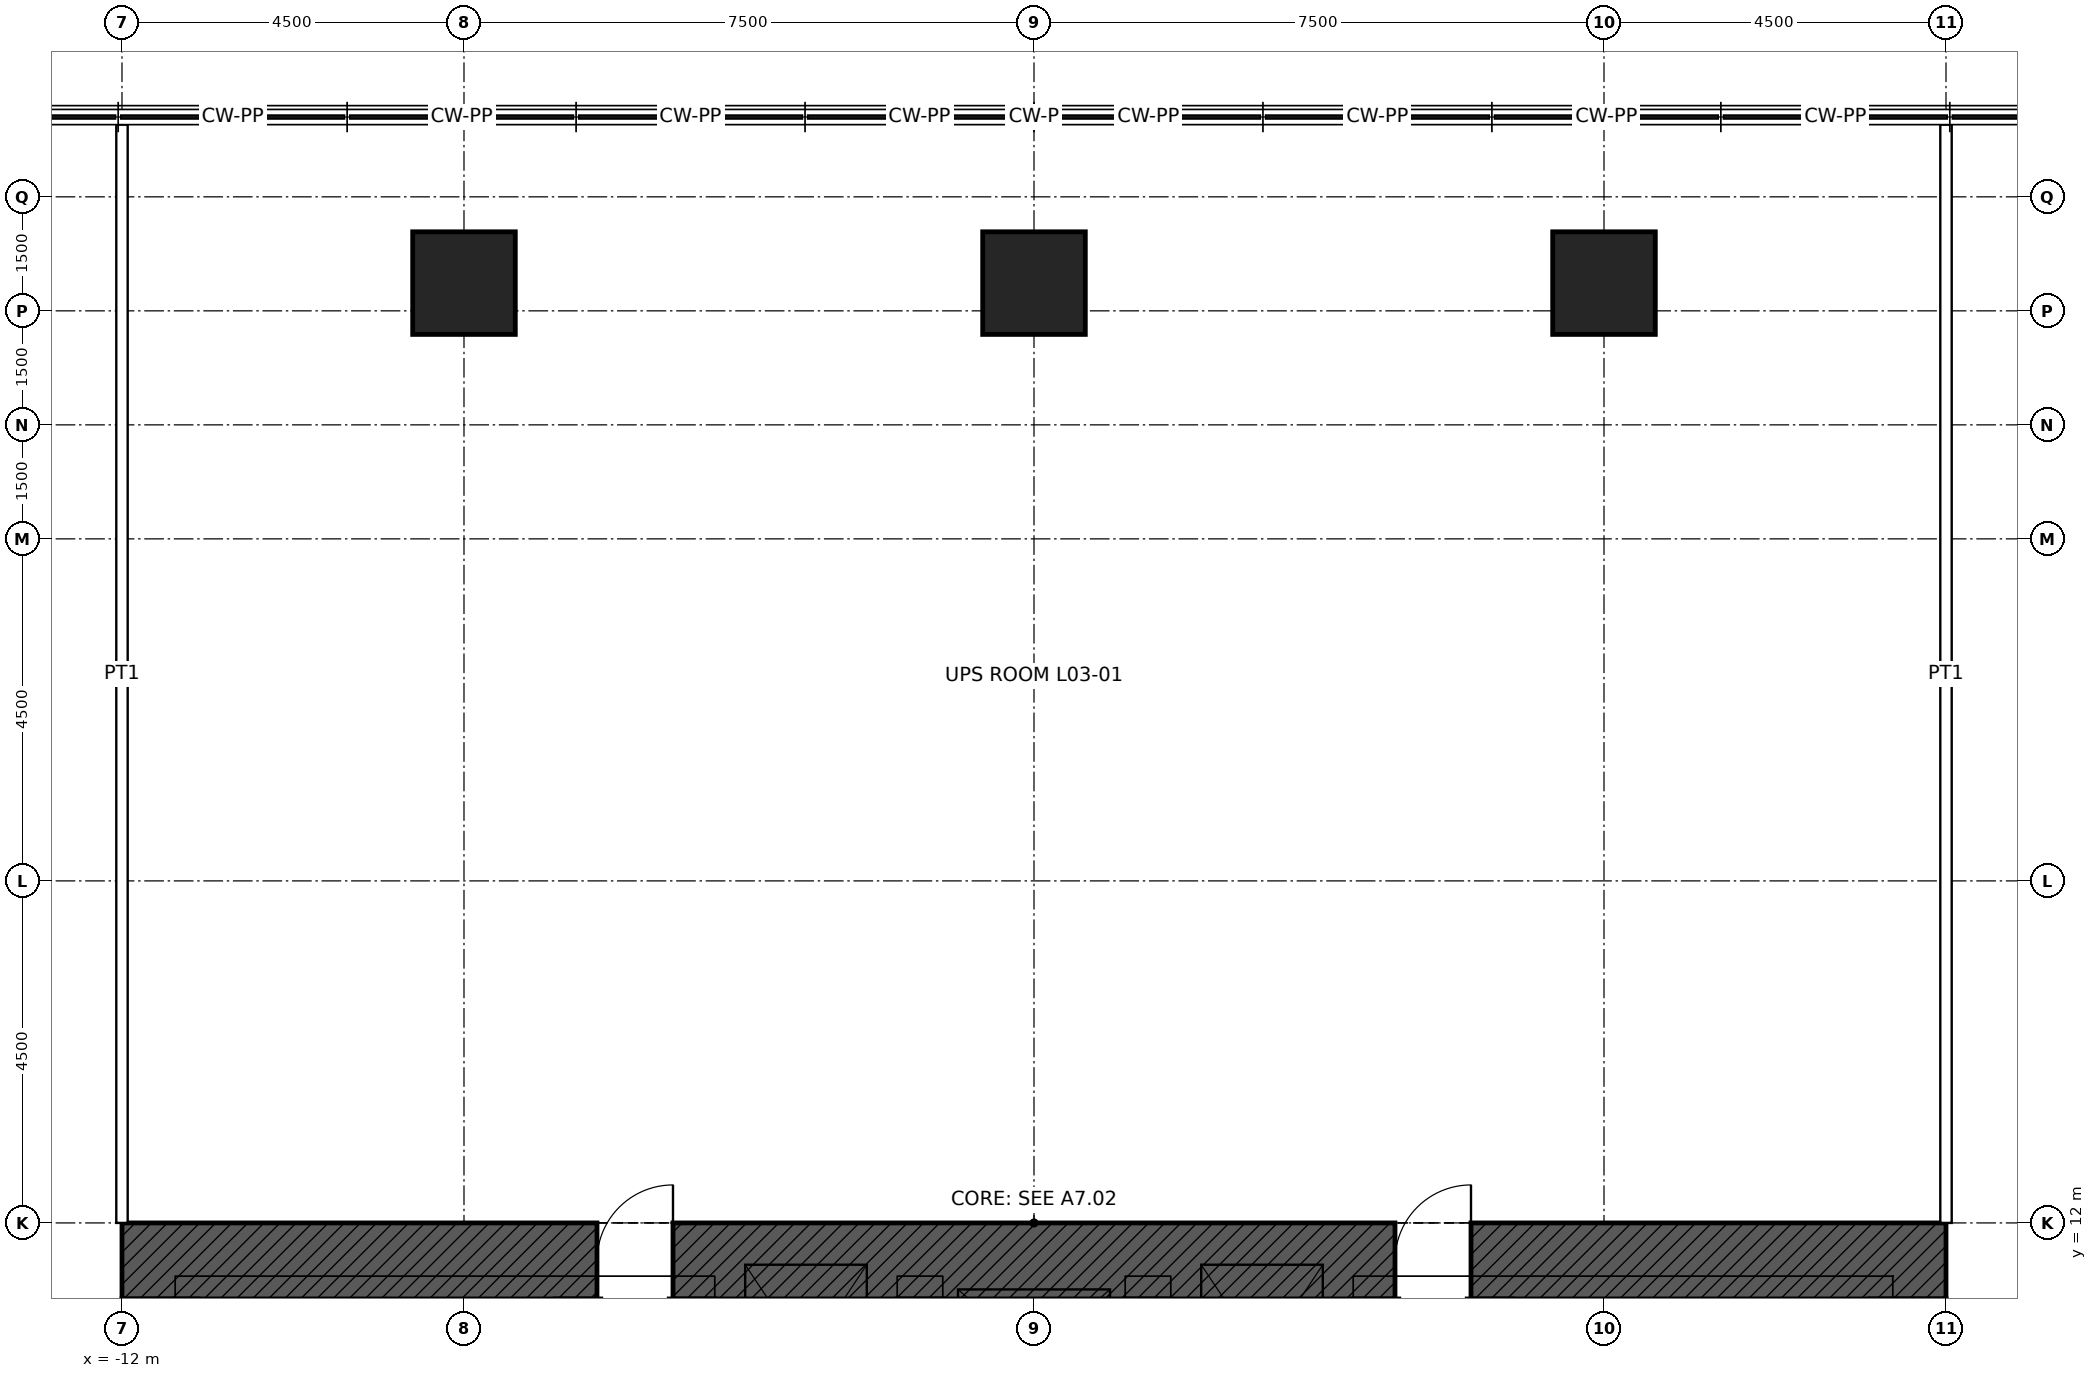
"""IFC4 building model, lengths in metres.
Left out: names, types, materials, properties, quantities, classifications, styles, units other than length and angle.
Written with IfcOpenShell. Run it as: python <this file> out.ifc"""

import sys

from ifc_helpers import new_model, si_unit, direction, frame, frame_2d, origin, origin_2d, place, context, subcontext, project, spatial, rectangle, hollow_rectangle, extrude, element, fill, save


model = new_model("IFC4")
c1 = context("Model", 3, precision=1e-05, world=origin(), true_north=direction((0.0, 1.0)))
c2 = subcontext(c1, "Body", "Model", "MODEL_VIEW")
j1 = project(units=[si_unit("LENGTHUNIT", "METRE"), si_unit("PLANEANGLEUNIT", "RADIAN")], contexts=[c1])
p1 = place(None, origin())
s1 = spatial("IfcSite", under=j1, at=p1, CompositionType="ELEMENT")
p2 = place(p1, origin())
s2 = spatial("IfcBuilding", under=s1, at=p2, CompositionType="ELEMENT")
p3 = place(p2, frame((0.0, 0.0, 18.0)))
s3 = spatial("IfcBuildingStorey", under=s2, at=p3, CompositionType="ELEMENT", Elevation=18.0)
for number, where, z_axis, x_axis in (
    (1, (-7.5, 24.365, 0.0), (0.0, 0.0, 1.0), (1.0, 0.0, 0.0)),
    (2, (0.0, 24.365, 0.0), (0.0, 0.0, 1.0), (1.0, 0.0, 0.0)),
    (3, (7.5, 24.365, 0.0), (0.0, 0.0, 1.0), (1.0, 0.0, 0.0)),
):
    element("IfcColumn", number, at=place(p3, frame(where, z_axis=z_axis, x_axis=x_axis)), inside=s3, PredefinedType="COLUMN", context=c2, shape_type="SweptSolid", body=[
        extrude(hollow_rectangle(XDim=1.35, YDim=1.35, WallThickness=0.1, at=origin_2d()), origin(), (0.0, 0.0, 1.0), 5.4),
    ])
p4 = place(p3, frame((-12.0, 11.5, 0.0), z_axis=(0.0, 0.0, 1.0), x_axis=(1.0, 0.0, 0.0)))
e4 = element("IfcWall", 4, at=p4, inside=s3, PredefinedType="SHEAR", context=c2, shape_type="SweptSolid", body=[
    extrude(rectangle(XDim=24.0, YDim=1.0, at=frame_2d((12.0, 0.0))), origin(), (0.0, 0.0, 1.0), 5.4),
])
p5 = place(p4, frame((6.25, 0.0, 0.0)))
e5 = element("IfcOpeningElement", 5, at=p5, cuts=e4, PredefinedType="OPENING", context=c2, shape_type="SweptSolid", body=[
    extrude(rectangle(XDim=1.0, YDim=2.4, at=frame_2d((0.5, 1.2))), frame((0.0, 0.51, 0.0), z_axis=(0.0, -1.0, 0.0), x_axis=(1.0, 0.0, 0.0)), (0.0, 0.0, 1.0), 1.02),
])
p6 = place(p4, frame((16.75, 0.0, 0.0)))
e6 = element("IfcOpeningElement", 6, at=p6, cuts=e4, PredefinedType="OPENING", context=c2, shape_type="SweptSolid", body=[
    extrude(rectangle(XDim=1.0, YDim=2.4, at=frame_2d((0.5, 1.2))), frame((0.0, 0.51, 0.0), z_axis=(0.0, -1.0, 0.0), x_axis=(1.0, 0.0, 0.0)), (0.0, 0.0, 1.0), 1.02),
])
p7 = place(p3, frame((-12.0, 12.0, 0.0), z_axis=(0.0, 0.0, 1.0), x_axis=(0.0, 1.0, 0.0)))
e7 = element("IfcWall", 7, at=p7, inside=s3, PredefinedType="PARTITIONING", context=c2, shape_type="SweptSolid", body=[
    extrude(rectangle(XDim=14.45, YDim=0.15, at=frame_2d((7.225, 0.0))), origin(), (0.0, 0.0, 1.0), 4.164),
])
p8 = place(p3, frame((12.0, 12.0, 0.0), z_axis=(0.0, 0.0, 1.0), x_axis=(0.0, 1.0, 0.0)))
e8 = element("IfcWall", 8, at=p8, inside=s3, PredefinedType="PARTITIONING", context=c2, shape_type="SweptSolid", body=[
    extrude(rectangle(XDim=14.45, YDim=0.15, at=frame_2d((7.225, 0.0))), origin(), (0.0, 0.0, 1.0), 5.2),
])
p9 = place(p5, origin())
e9 = element("IfcDoor", 9, at=p9, inside=s3, OperationType="SINGLE_SWING_RIGHT", PredefinedType="DOOR", context=c2, shape_type="SweptSolid", body=[
    extrude(rectangle(XDim=1.0, YDim=2.4, at=frame_2d((0.5, 1.2))), frame((0.0, 0.485, 0.0), z_axis=(0.0, -1.0, 0.0), x_axis=(1.0, 0.0, 0.0)), (0.0, 0.0, 1.0), 0.05),
])
fill(e5, e9)
p10 = place(p6, origin())
e10 = element("IfcDoor", 10, at=p10, inside=s3, OperationType="SINGLE_SWING_RIGHT", PredefinedType="DOOR", context=c2, shape_type="SweptSolid", body=[
    extrude(rectangle(XDim=1.0, YDim=2.4, at=frame_2d((0.5, 1.2))), frame((0.0, 0.485, 0.0), z_axis=(0.0, -1.0, 0.0), x_axis=(1.0, 0.0, 0.0)), (0.0, 0.0, 1.0), 0.05),
])
fill(e6, e10)
save(model, sys.argv[1])
